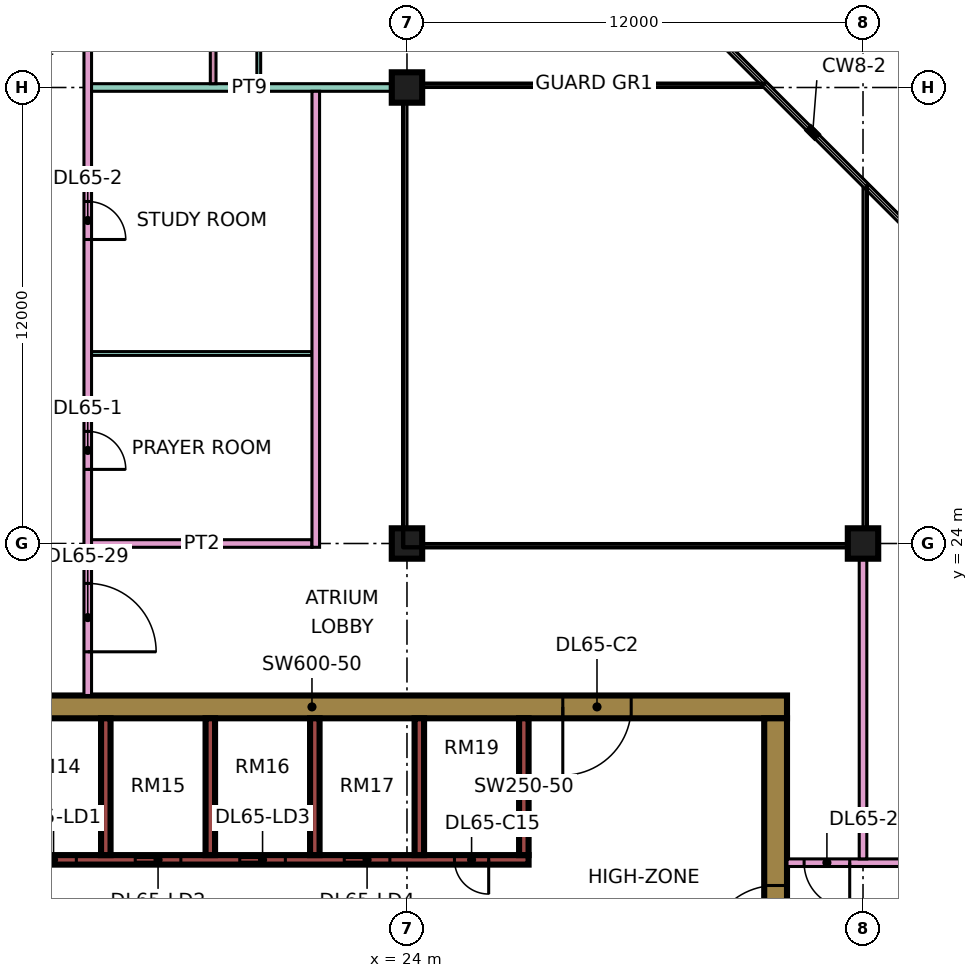
"""IFC4 building model, lengths in metres.
Left out: names, types, materials, properties, quantities, classifications, styles, units other than length and angle.
Written with IfcOpenShell. Run it as: python <this file> out.ifc"""

import sys

from ifc_helpers import new_model, si_unit, direction, frame, frame_2d, origin, origin_2d, place, context, subcontext, project, spatial, rectangle, extrude, element, fill, save


model = new_model("IFC4")
c1 = context("Model", 3, precision=1e-05, world=origin(), true_north=direction((0.0, 1.0)))
c2 = subcontext(c1, "Body", "Model", "MODEL_VIEW")
j1 = project(units=[si_unit("LENGTHUNIT", "METRE"), si_unit("PLANEANGLEUNIT", "RADIAN")], contexts=[c1])
p1 = place(None, origin())
s1 = spatial("IfcSite", under=j1, at=p1, CompositionType="ELEMENT")
p2 = place(p1, origin())
s2 = spatial("IfcBuilding", under=s1, at=p2, CompositionType="ELEMENT")
p3 = place(p2, frame((0.0, 0.0, 280.9)))
s3 = spatial("IfcBuildingStorey", under=s2, at=p3, CompositionType="ELEMENT", Elevation=280.9)
for number, where, z_axis, x_axis in (
    (1, (24.0, 24.0, 0.0), (0.0, 0.0, 1.0), (1.0, 0.0, 0.0)),
    (2, (24.0, 36.0, 0.0), (0.0, 0.0, 1.0), (1.0, 0.0, 0.0)),
    (3, (36.0, 24.0, 0.0), (0.0, 0.0, 1.0), (1.0, 0.0, 0.0)),
):
    element("IfcColumn", number, at=place(p3, frame(where, z_axis=z_axis, x_axis=x_axis)), inside=s3, PredefinedType="COLUMN", context=c2, shape_type="SweptSolid", body=[
        extrude(rectangle(XDim=0.8, YDim=0.8, at=origin_2d()), origin(), (0.0, 0.0, 1.0), 3.75),
    ])
p4 = place(p3, frame((9.0, 19.7, 0.0), z_axis=(0.0, 0.0, 1.0), x_axis=(1.0, 0.0, 0.0)))
e4 = element("IfcWall", 4, at=p4, inside=s3, PredefinedType="SHEAR", context=c2, shape_type="SweptSolid", body=[
    extrude(rectangle(XDim=25.0, YDim=0.6, at=frame_2d((12.5, 0.0))), origin(), (0.0, 0.0, 1.0), 3.75),
])
p5 = place(p4, frame((19.1, 0.0, 0.0)))
e5 = element("IfcOpeningElement", 5, at=p5, cuts=e4, PredefinedType="OPENING", context=c2, shape_type="SweptSolid", body=[
    extrude(rectangle(XDim=1.8, YDim=2.4, at=frame_2d((0.9, 1.2))), frame((0.0, 0.31, 0.0), z_axis=(0.0, -1.0, 0.0), x_axis=(1.0, 0.0, 0.0)), (0.0, 0.0, 1.0), 0.62),
])
p6 = place(p3, frame((33.7, 7.6, 0.0), z_axis=(0.0, 0.0, 1.0), x_axis=(0.0, 1.0, 0.0)))
e6 = element("IfcWall", 6, at=p6, inside=s3, PredefinedType="SHEAR", context=c2, shape_type="SweptSolid", body=[
    extrude(rectangle(XDim=11.8, YDim=0.6, at=frame_2d((5.9, 0.0))), origin(), (0.0, 0.0, 1.0), 3.75),
])
p7 = place(p6, frame((5.6, 0.0, 0.0)))
e7 = element("IfcOpeningElement", 7, at=p7, cuts=e6, PredefinedType="OPENING", context=c2, shape_type="SweptSolid", body=[
    extrude(rectangle(XDim=1.8, YDim=2.4, at=frame_2d((0.9, 1.2))), frame((0.0, 0.31, 0.0), z_axis=(0.0, -1.0, 0.0), x_axis=(1.0, 0.0, 0.0)), (0.0, 0.0, 1.0), 0.62),
])
p8 = place(p3, frame((13.45, 15.675, 0.0), z_axis=(0.0, 0.0, 1.0), x_axis=(1.0, 0.0, 0.0)))
e8 = element("IfcWall", 8, at=p8, inside=s3, PredefinedType="SHEAR", context=c2, shape_type="SweptSolid", body=[
    extrude(rectangle(XDim=13.75, YDim=0.25, at=frame_2d((6.875, 0.0))), origin(), (0.0, 0.0, 1.0), 3.75),
])
p9 = place(p8, frame((0.65, 0.0, 0.0)))
e9 = element("IfcOpeningElement", 9, at=p9, cuts=e8, PredefinedType="OPENING", context=c2, shape_type="SweptSolid", body=[
    extrude(rectangle(XDim=1.2, YDim=2.2, at=frame_2d((0.6, 1.1))), frame((0.0, 0.135, 0.0), z_axis=(0.0, -1.0, 0.0), x_axis=(1.0, 0.0, 0.0)), (0.0, 0.0, 1.0), 0.27),
])
p10 = place(p8, frame((3.4, 0.0, 0.0)))
e10 = element("IfcOpeningElement", 10, at=p10, cuts=e8, PredefinedType="OPENING", context=c2, shape_type="SweptSolid", body=[
    extrude(rectangle(XDim=1.2, YDim=2.2, at=frame_2d((0.6, 1.1))), frame((0.0, 0.135, 0.0), z_axis=(0.0, -1.0, 0.0), x_axis=(1.0, 0.0, 0.0)), (0.0, 0.0, 1.0), 0.27),
])
p11 = place(p8, frame((6.15, 0.0, 0.0)))
e11 = element("IfcOpeningElement", 11, at=p11, cuts=e8, PredefinedType="OPENING", context=c2, shape_type="SweptSolid", body=[
    extrude(rectangle(XDim=1.2, YDim=2.2, at=frame_2d((0.6, 1.1))), frame((0.0, 0.135, 0.0), z_axis=(0.0, -1.0, 0.0), x_axis=(1.0, 0.0, 0.0)), (0.0, 0.0, 1.0), 0.27),
])
p12 = place(p8, frame((8.9, 0.0, 0.0)))
e12 = element("IfcOpeningElement", 12, at=p12, cuts=e8, PredefinedType="OPENING", context=c2, shape_type="SweptSolid", body=[
    extrude(rectangle(XDim=1.2, YDim=2.2, at=frame_2d((0.6, 1.1))), frame((0.0, 0.135, 0.0), z_axis=(0.0, -1.0, 0.0), x_axis=(1.0, 0.0, 0.0)), (0.0, 0.0, 1.0), 0.27),
])
p13 = place(p8, frame((11.8, 0.0, 0.0)))
e13 = element("IfcOpeningElement", 13, at=p13, cuts=e8, PredefinedType="OPENING", context=c2, shape_type="SweptSolid", body=[
    extrude(rectangle(XDim=0.9, YDim=2.1, at=frame_2d((0.45, 1.05))), frame((0.0, 0.135, 0.0), z_axis=(0.0, -1.0, 0.0), x_axis=(1.0, 0.0, 0.0)), (0.0, 0.0, 1.0), 0.27),
])
for number, where, z_axis, x_axis in (
    (14, (16.075, 15.8, 0.0), (0.0, 0.0, 1.0), (0.0, 1.0, 0.0)),
    (15, (18.825, 15.8, 0.0), (0.0, 0.0, 1.0), (0.0, 1.0, 0.0)),
    (16, (21.575, 15.8, 0.0), (0.0, 0.0, 1.0), (0.0, 1.0, 0.0)),
    (17, (24.325, 15.8, 0.0), (0.0, 0.0, 1.0), (0.0, 1.0, 0.0)),
    (18, (27.075, 15.8, 0.0), (0.0, 0.0, 1.0), (0.0, 1.0, 0.0)),
):
    element("IfcWall", number, at=place(p3, frame(where, z_axis=z_axis, x_axis=x_axis)), inside=s3, PredefinedType="SHEAR", context=c2, shape_type="SweptSolid", body=[
        extrude(rectangle(XDim=3.6, YDim=0.25, at=frame_2d((1.8, 0.0))), origin(), (0.0, 0.0, 1.0), 3.75),
    ])
p14 = place(p3, frame((15.6, 20.0, 0.0), z_axis=(0.0, 0.0, 1.0), x_axis=(0.0, 1.0, 0.0)))
e19 = element("IfcWall", 19, at=p14, inside=s3, PredefinedType="PARTITIONING", context=c2, shape_type="SweptSolid", body=[
    extrude(rectangle(XDim=27.775, YDim=0.2, at=frame_2d((13.887, 0.0))), origin(), (0.0, 0.0, 1.0), 3.35),
])
p15 = place(p14, frame((5.95, 0.0, 0.0)))
e20 = element("IfcOpeningElement", 20, at=p15, cuts=e19, PredefinedType="OPENING", context=c2, shape_type="SweptSolid", body=[
    extrude(rectangle(XDim=1.0, YDim=2.1, at=frame_2d((0.5, 1.05))), frame((0.0, 0.11, 0.0), z_axis=(0.0, -1.0, 0.0), x_axis=(1.0, 0.0, 0.0)), (0.0, 0.0, 1.0), 0.22),
])
p16 = place(p14, frame((12.0, 0.0, 0.0)))
e21 = element("IfcOpeningElement", 21, at=p16, cuts=e19, PredefinedType="OPENING", context=c2, shape_type="SweptSolid", body=[
    extrude(rectangle(XDim=1.0, YDim=2.1, at=frame_2d((0.5, 1.05))), frame((0.0, 0.11, 0.0), z_axis=(0.0, -1.0, 0.0), x_axis=(1.0, 0.0, 0.0)), (0.0, 0.0, 1.0), 0.22),
])
p17 = place(p14, frame((22.9, 0.0, 0.0)))
e22 = element("IfcOpeningElement", 22, at=p17, cuts=e19, PredefinedType="OPENING", context=c2, shape_type="SweptSolid", body=[
    extrude(rectangle(XDim=1.0, YDim=2.1, at=frame_2d((0.5, 1.05))), frame((0.0, 0.11, 0.0), z_axis=(0.0, -1.0, 0.0), x_axis=(1.0, 0.0, 0.0)), (0.0, 0.0, 1.0), 0.22),
])
p18 = place(p14, frame((1.15, 0.0, 0.0)))
e23 = element("IfcOpeningElement", 23, at=p18, cuts=e19, PredefinedType="OPENING", context=c2, shape_type="SweptSolid", body=[
    extrude(rectangle(XDim=1.8, YDim=2.1, at=frame_2d((0.9, 1.05))), frame((0.0, 0.11, 0.0), z_axis=(0.0, -1.0, 0.0), x_axis=(1.0, 0.0, 0.0)), (0.0, 0.0, 1.0), 0.22),
])
p19 = place(p14, frame((25.9, 0.0, 0.0)))
e24 = element("IfcOpeningElement", 24, at=p19, cuts=e19, PredefinedType="OPENING", context=c2, shape_type="SweptSolid", body=[
    extrude(rectangle(XDim=1.0, YDim=2.1, at=frame_2d((0.5, 1.05))), frame((0.0, 0.11, 0.0), z_axis=(0.0, -1.0, 0.0), x_axis=(1.0, 0.0, 0.0)), (0.0, 0.0, 1.0), 0.22),
])
p20 = place(p3, frame((15.7, 24.0, 0.0), z_axis=(0.0, 0.0, 1.0), x_axis=(1.0, 0.0, 0.0)))
e25 = element("IfcWall", 25, at=p20, inside=s3, PredefinedType="PARTITIONING", context=c2, shape_type="SweptSolid", body=[
    extrude(rectangle(XDim=5.8, YDim=0.2, at=frame_2d((2.9, 0.0))), origin(), (0.0, 0.0, 1.0), 3.35),
])
p21 = place(p3, frame((15.7, 29.0, 0.0), z_axis=(0.0, 0.0, 1.0), x_axis=(1.0, 0.0, 0.0)))
e26 = element("IfcWall", 26, at=p21, inside=s3, PredefinedType="PARTITIONING", context=c2, shape_type="SweptSolid", body=[
    extrude(rectangle(XDim=5.8, YDim=0.1, at=frame_2d((2.9, 0.0))), origin(), (0.0, 0.0, 1.0), 3.35),
])
p22 = place(p3, frame((15.7, 36.0, 0.0), z_axis=(0.0, 0.0, 1.0), x_axis=(1.0, 0.0, 0.0)))
e27 = element("IfcWall", 27, at=p22, inside=s3, PredefinedType="PARTITIONING", context=c2, shape_type="SweptSolid", body=[
    extrude(rectangle(XDim=8.3, YDim=0.2, at=frame_2d((4.15, 0.0))), origin(), (0.0, 0.0, 1.0), 3.35),
])
p23 = place(p3, frame((18.9, 36.1, 0.0), z_axis=(0.0, 0.0, 1.0), x_axis=(0.0, 1.0, 0.0)))
e28 = element("IfcWall", 28, at=p23, inside=s3, PredefinedType="PARTITIONING", context=c2, shape_type="SweptSolid", body=[
    extrude(rectangle(XDim=5.675, YDim=0.15, at=frame_2d((2.837, 0.0))), origin(), (0.0, 0.0, 1.0), 3.35),
])
p24 = place(p23, frame((1.1, 0.0, 0.0)))
e29 = element("IfcOpeningElement", 29, at=p24, cuts=e28, PredefinedType="OPENING", context=c2, shape_type="SweptSolid", body=[
    extrude(rectangle(XDim=0.9, YDim=2.1, at=frame_2d((0.45, 1.05))), frame((0.0, 0.085, 0.0), z_axis=(0.0, -1.0, 0.0), x_axis=(1.0, 0.0, 0.0)), (0.0, 0.0, 1.0), 0.17),
])
p25 = place(p3, frame((20.1, 36.1, 0.0), z_axis=(0.0, 0.0, 1.0), x_axis=(0.0, 1.0, 0.0)))
e30 = element("IfcWall", 30, at=p25, inside=s3, PredefinedType="PARTITIONING", context=c2, shape_type="SweptSolid", body=[
    extrude(rectangle(XDim=5.95, YDim=0.1, at=frame_2d((2.975, 0.0))), origin(), (0.0, 0.0, 1.0), 3.35),
])
p26 = place(p25, frame((0.95, 0.0, 0.0)))
e31 = element("IfcOpeningElement", 31, at=p26, cuts=e30, PredefinedType="OPENING", context=c2, shape_type="SweptSolid", body=[
    extrude(rectangle(XDim=0.9, YDim=2.1, at=frame_2d((0.45, 1.05))), frame((0.0, 0.06, 0.0), z_axis=(0.0, -1.0, 0.0), x_axis=(1.0, 0.0, 0.0)), (0.0, 0.0, 1.0), 0.12),
])
p27 = place(p25, frame((3.95, 0.0, 0.0)))
e32 = element("IfcOpeningElement", 32, at=p27, cuts=e30, PredefinedType="OPENING", context=c2, shape_type="SweptSolid", body=[
    extrude(rectangle(XDim=0.9, YDim=2.1, at=frame_2d((0.45, 1.05))), frame((0.0, 0.06, 0.0), z_axis=(0.0, -1.0, 0.0), x_axis=(1.0, 0.0, 0.0)), (0.0, 0.0, 1.0), 0.12),
])
p28 = place(p3, frame((21.6, 23.9, 0.0), z_axis=(0.0, 0.0, 1.0), x_axis=(0.0, 1.0, 0.0)))
e33 = element("IfcWall", 33, at=p28, inside=s3, PredefinedType="PARTITIONING", context=c2, shape_type="SweptSolid", body=[
    extrude(rectangle(XDim=12.0, YDim=0.2, at=frame_2d((6.0, 0.0))), origin(), (0.0, 0.0, 1.0), 3.35),
])
p29 = place(p3, frame((34.0, 15.6, 0.0), z_axis=(0.0, 0.0, 1.0), x_axis=(1.0, 0.0, 0.0)))
e34 = element("IfcWall", 34, at=p29, inside=s3, PredefinedType="PARTITIONING", context=c2, shape_type="SweptSolid", body=[
    extrude(rectangle(XDim=10.35, YDim=0.2, at=frame_2d((5.175, 0.0))), origin(), (0.0, 0.0, 1.0), 3.35),
])
p30 = place(p29, frame((5.6, 0.0, 0.0)))
e35 = element("IfcOpeningElement", 35, at=p30, cuts=e34, PredefinedType="OPENING", context=c2, shape_type="SweptSolid", body=[
    extrude(rectangle(XDim=1.0, YDim=2.1, at=frame_2d((0.5, 1.05))), frame((0.0, 0.11, 0.0), z_axis=(0.0, -1.0, 0.0), x_axis=(1.0, 0.0, 0.0)), (0.0, 0.0, 1.0), 0.22),
])
p31 = place(p29, frame((0.45, 0.0, 0.0)))
e36 = element("IfcOpeningElement", 36, at=p31, cuts=e34, PredefinedType="OPENING", context=c2, shape_type="SweptSolid", body=[
    extrude(rectangle(XDim=1.2, YDim=2.1, at=frame_2d((0.6, 1.05))), frame((0.0, 0.11, 0.0), z_axis=(0.0, -1.0, 0.0), x_axis=(1.0, 0.0, 0.0)), (0.0, 0.0, 1.0), 0.22),
])
p32 = place(p3, frame((36.0, 15.7, 0.0), z_axis=(0.0, 0.0, 1.0), x_axis=(0.0, 1.0, 0.0)))
e37 = element("IfcWall", 37, at=p32, inside=s3, PredefinedType="PARTITIONING", context=c2, shape_type="SweptSolid", body=[
    extrude(rectangle(XDim=8.3, YDim=0.2, at=frame_2d((4.15, 0.0))), origin(), (0.0, 0.0, 1.0), 3.35),
])
p33 = place(p9, origin())
e38 = element("IfcDoor", 38, at=p33, inside=s3, OperationType="DOUBLE_DOOR_SLIDING", PredefinedType="DOOR", context=c2, shape_type="SweptSolid", body=[
    extrude(rectangle(XDim=1.2, YDim=2.2, at=frame_2d((0.6, 1.1))), frame((0.0, 0.025, 0.0), z_axis=(0.0, -1.0, 0.0), x_axis=(1.0, 0.0, 0.0)), (0.0, 0.0, 1.0), 0.05),
])
fill(e9, e38)
p34 = place(p10, origin())
e39 = element("IfcDoor", 39, at=p34, inside=s3, OperationType="DOUBLE_DOOR_SLIDING", PredefinedType="DOOR", context=c2, shape_type="SweptSolid", body=[
    extrude(rectangle(XDim=1.2, YDim=2.2, at=frame_2d((0.6, 1.1))), frame((0.0, 0.025, 0.0), z_axis=(0.0, -1.0, 0.0), x_axis=(1.0, 0.0, 0.0)), (0.0, 0.0, 1.0), 0.05),
])
fill(e10, e39)
p35 = place(p11, origin())
e40 = element("IfcDoor", 40, at=p35, inside=s3, OperationType="DOUBLE_DOOR_SLIDING", PredefinedType="DOOR", context=c2, shape_type="SweptSolid", body=[
    extrude(rectangle(XDim=1.2, YDim=2.2, at=frame_2d((0.6, 1.1))), frame((0.0, 0.025, 0.0), z_axis=(0.0, -1.0, 0.0), x_axis=(1.0, 0.0, 0.0)), (0.0, 0.0, 1.0), 0.05),
])
fill(e11, e40)
p36 = place(p12, origin())
e41 = element("IfcDoor", 41, at=p36, inside=s3, OperationType="DOUBLE_DOOR_SLIDING", PredefinedType="DOOR", context=c2, shape_type="SweptSolid", body=[
    extrude(rectangle(XDim=1.2, YDim=2.2, at=frame_2d((0.6, 1.1))), frame((0.0, 0.025, 0.0), z_axis=(0.0, -1.0, 0.0), x_axis=(1.0, 0.0, 0.0)), (0.0, 0.0, 1.0), 0.05),
])
fill(e12, e41)
p37 = place(p7, origin())
e42 = element("IfcDoor", 42, at=p37, inside=s3, OperationType="DOUBLE_DOOR_SINGLE_SWING", PredefinedType="DOOR", context=c2, shape_type="SweptSolid", body=[
    extrude(rectangle(XDim=1.8, YDim=2.4, at=frame_2d((0.9, 1.2))), frame((0.0, 0.025, 0.0), z_axis=(0.0, -1.0, 0.0), x_axis=(1.0, 0.0, 0.0)), (0.0, 0.0, 1.0), 0.05),
])
fill(e7, e42)
p38 = place(p5, frame((1.8, 0.0, 0.0), z_axis=(0.0, 0.0, 1.0), x_axis=(-1.0, 0.0, 0.0)))
e43 = element("IfcDoor", 43, at=p38, inside=s3, OperationType="DOUBLE_DOOR_SINGLE_SWING", PredefinedType="DOOR", context=c2, shape_type="SweptSolid", body=[
    extrude(rectangle(XDim=1.8, YDim=2.4, at=frame_2d((0.9, 1.2))), frame((0.0, 0.025, 0.0), z_axis=(0.0, -1.0, 0.0), x_axis=(1.0, 0.0, 0.0)), (0.0, 0.0, 1.0), 0.05),
])
fill(e5, e43)
p39 = place(p13, origin())
e44 = element("IfcDoor", 44, at=p39, inside=s3, OperationType="SINGLE_SWING_RIGHT", PredefinedType="DOOR", context=c2, shape_type="SweptSolid", body=[
    extrude(rectangle(XDim=0.9, YDim=2.1, at=frame_2d((0.45, 1.05))), frame((0.0, 0.025, 0.0), z_axis=(0.0, -1.0, 0.0), x_axis=(1.0, 0.0, 0.0)), (0.0, 0.0, 1.0), 0.05),
])
fill(e13, e44)
p40 = place(p15, frame((1.0, 0.0, 0.0), z_axis=(0.0, 0.0, 1.0), x_axis=(-1.0, 0.0, 0.0)))
e45 = element("IfcDoor", 45, at=p40, inside=s3, OperationType="SINGLE_SWING_LEFT", PredefinedType="DOOR", context=c2, shape_type="SweptSolid", body=[
    extrude(rectangle(XDim=1.0, YDim=2.1, at=frame_2d((0.5, 1.05))), frame((0.0, 0.025, 0.0), z_axis=(0.0, -1.0, 0.0), x_axis=(1.0, 0.0, 0.0)), (0.0, 0.0, 1.0), 0.05),
])
fill(e20, e45)
p41 = place(p16, frame((1.0, 0.0, 0.0), z_axis=(0.0, 0.0, 1.0), x_axis=(-1.0, 0.0, 0.0)))
e46 = element("IfcDoor", 46, at=p41, inside=s3, OperationType="SINGLE_SWING_LEFT", PredefinedType="DOOR", context=c2, shape_type="SweptSolid", body=[
    extrude(rectangle(XDim=1.0, YDim=2.1, at=frame_2d((0.5, 1.05))), frame((0.0, 0.025, 0.0), z_axis=(0.0, -1.0, 0.0), x_axis=(1.0, 0.0, 0.0)), (0.0, 0.0, 1.0), 0.05),
])
fill(e21, e46)
p42 = place(p31, origin())
e47 = element("IfcDoor", 47, at=p42, inside=s3, OperationType="SINGLE_SWING_RIGHT", PredefinedType="DOOR", context=c2, shape_type="SweptSolid", body=[
    extrude(rectangle(XDim=1.2, YDim=2.1, at=frame_2d((0.6, 1.05))), frame((0.0, 0.025, 0.0), z_axis=(0.0, -1.0, 0.0), x_axis=(1.0, 0.0, 0.0)), (0.0, 0.0, 1.0), 0.05),
])
fill(e36, e47)
p43 = place(p18, frame((1.8, 0.0, 0.0), z_axis=(0.0, 0.0, 1.0), x_axis=(-1.0, 0.0, 0.0)))
e48 = element("IfcDoor", 48, at=p43, inside=s3, OperationType="DOUBLE_DOOR_SINGLE_SWING", PredefinedType="DOOR", context=c2, shape_type="SweptSolid", body=[
    extrude(rectangle(XDim=1.8, YDim=2.1, at=frame_2d((0.9, 1.05))), frame((0.0, 0.025, 0.0), z_axis=(0.0, -1.0, 0.0), x_axis=(1.0, 0.0, 0.0)), (0.0, 0.0, 1.0), 0.05),
])
fill(e23, e48)
save(model, sys.argv[1])
